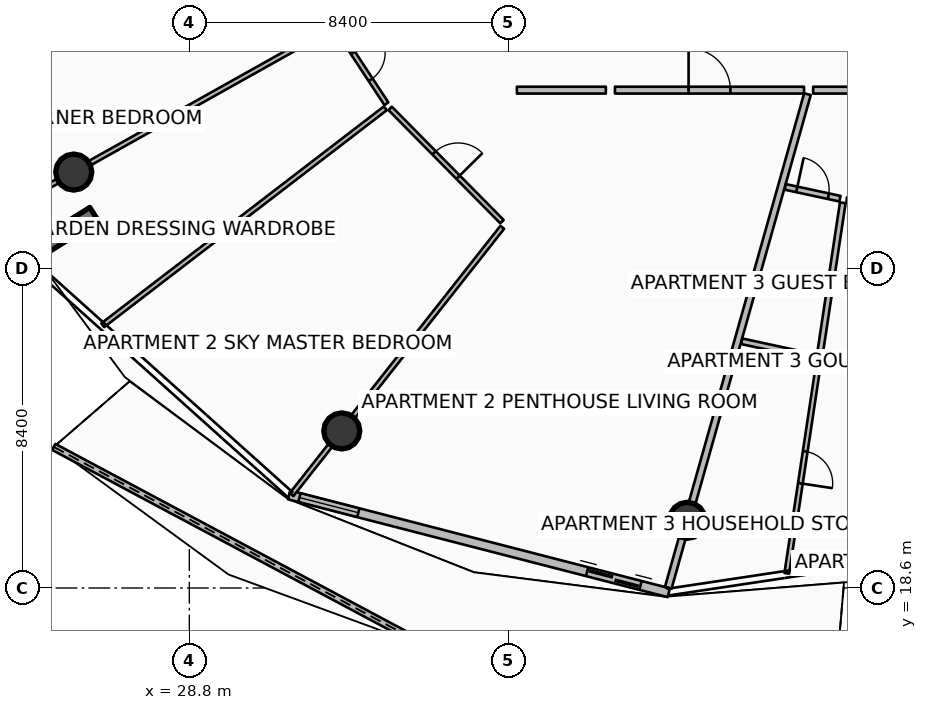
"""IFC4 building model, lengths in metres.
Left out: names, types, materials, properties, quantities, classifications, styles, units other than length and angle.
Written with IfcOpenShell. Run it as: python <this file> out.ifc"""

import sys

from ifc_helpers import new_model, si_unit, direction, frame, frame_2d, origin, origin_2d, place, context, subcontext, project, spatial, polyline, rectangle, circle, outline, extrude, element, fill, save


model = new_model("IFC4")
c1 = context("Model", 3, precision=1e-05, world=origin(), true_north=direction((0.0, 1.0)))
c2 = subcontext(c1, "Body", "Model", "MODEL_VIEW")
j1 = project(units=[si_unit("LENGTHUNIT", "METRE"), si_unit("PLANEANGLEUNIT", "RADIAN")], contexts=[c1])
p1 = place(None, origin())
s1 = spatial("IfcSite", under=j1, at=p1, CompositionType="ELEMENT")
p2 = place(p1, origin())
s2 = spatial("IfcBuilding", under=s1, at=p2, CompositionType="ELEMENT")
p3 = place(p2, frame((0.0, 0.0, 309.85)))
s3 = spatial("IfcBuildingStorey", under=s2, at=p3, CompositionType="ELEMENT", Elevation=309.85)
p4 = place(p3, frame((26.293, 28.436, 0.0), z_axis=(0.0, 0.0, 1.0), x_axis=(-0.848053161125, -0.529911158502, 0.0)))
e1 = element("IfcWall", 1, at=p4, inside=s3, PredefinedType="SOLIDWALL", context=c2, shape_type="SweptSolid", body=[
    extrude(rectangle(XDim=3.5, YDim=0.42, at=frame_2d((1.75, 0.0))), origin(), (0.0, 0.0, 1.0), 3.85),
])
p5 = place(p3, frame((25.758, 29.544, 0.0), z_axis=(0.31032645066, 0.173748419839, 0.934617023504), x_axis=(-0.488529751374, 0.872547237703, 0.0)))
e2 = element("IfcColumn", 2, at=p5, inside=s3, PredefinedType="COLUMN", context=c2, shape_type="SweptSolid", body=[
    extrude(circle(Radius=0.475, at=origin_2d()), origin(), (0.0, 0.0, 1.0), 3.691),
])
p6 = place(p3, frame((32.811, 22.733, 0.0), z_axis=(0.212907110385, 0.270054462111, 0.939010729354), x_axis=(-0.785298072574, 0.619117870208, 0.0)))
e3 = element("IfcColumn", 3, at=p6, inside=s3, PredefinedType="COLUMN", context=c2, shape_type="SweptSolid", body=[
    extrude(circle(Radius=0.475, at=origin_2d()), origin(), (0.0, 0.0, 1.0), 3.674),
])
p7 = place(p3, frame((41.903, 20.381, 0.0), z_axis=(0.086284912029, 0.305955831144, 0.948127598662), x_axis=(-0.962458159265, 0.271430086144, 0.0)))
e4 = element("IfcColumn", 4, at=p7, inside=s3, PredefinedType="COLUMN", context=c2, shape_type="SweptSolid", body=[
    extrude(circle(Radius=0.475, at=origin_2d()), origin(), (0.0, 0.0, 1.0), 3.639),
])
p8 = place(p3, frame((25.232, 22.312, 0.0), z_axis=(0.0, 0.0, 1.0), x_axis=(0.882187395897, -0.470898501294, 0.0)))
e5 = element("IfcWall", 5, at=p8, inside=s3, PredefinedType="PARAPET", context=c2, shape_type="SweptSolid", body=[
    extrude(outline(polyline([(0.0, 0.0), (11.23, 0.0), (11.23, 1.632), (5.615, 1.798), (0.0, 1.86), (0.0, 0.0)])), frame((0.0, 0.09, 0.0), z_axis=(0.0, -1.0, 0.0), x_axis=(1.0, 0.0, 0.0)), (0.0, 0.0, 1.0), 0.18),
])
p9 = place(p3, frame((31.426, 21.05, 0.0), z_axis=(0.0, 0.0, 1.0), x_axis=(0.968369046262, -0.249522324133, 0.0)))
e6 = element("IfcWall", 6, at=p9, inside=s3, PredefinedType="SOLIDWALL", context=c2, shape_type="SweptSolid", body=[
    extrude(rectangle(XDim=10.318, YDim=0.24, at=frame_2d((5.159, 0.0))), origin(), (0.0, 0.0, 1.0), 2.4),
])
p10 = place(p9, frame((8.097, 0.0, 0.0)))
e7 = element("IfcOpeningElement", 7, at=p10, cuts=e6, PredefinedType="OPENING", context=c2, shape_type="SweptSolid", body=[
    extrude(rectangle(XDim=1.45, YDim=2.15, at=frame_2d((0.725, 1.075))), frame((0.0, 0.13, 0.0), z_axis=(0.0, -1.0, 0.0), x_axis=(1.0, 0.0, 0.0)), (0.0, 0.0, 1.0), 0.26),
])
p11 = place(p9, frame((0.28, 0.0, 0.65)))
e8 = element("IfcOpeningElement", 8, at=p11, cuts=e6, PredefinedType="OPENING", context=c2, shape_type="SweptSolid", body=[
    extrude(rectangle(XDim=1.6, YDim=1.5, at=frame_2d((0.8, 0.75))), frame((0.0, 0.13, 0.0), z_axis=(0.0, -1.0, 0.0), x_axis=(1.0, 0.0, 0.0)), (0.0, 0.0, 1.0), 0.26),
])
p12 = place(p3, frame((45.065, 31.594, 0.0), z_axis=(0.0, 0.0, 1.0), x_axis=(-0.271447701057, -0.962453191376, 0.0)))
e9 = element("IfcWall", 9, at=p12, inside=s3, PredefinedType="PARTITIONING", context=c2, shape_type="SweptSolid", body=[
    extrude(rectangle(XDim=13.492, YDim=0.18, at=frame_2d((6.746, 0.0))), origin(), (0.0, 0.0, 1.0), 2.407),
])
p13 = place(p3, frame((40.0, 31.7, 0.0), z_axis=(0.0, 0.0, 1.0), x_axis=(1.0, 0.0, 0.0)))
e10 = element("IfcWall", 10, at=p13, inside=s3, PredefinedType="PARTITIONING", context=c2, shape_type="SweptSolid", body=[
    extrude(rectangle(XDim=4.975, YDim=0.18, at=frame_2d((2.488, 0.0))), origin(), (0.0, 0.0, 1.0), 2.407),
])
p14 = place(p13, frame((1.938, 0.0, 0.0)))
e11 = element("IfcOpeningElement", 11, at=p14, cuts=e10, PredefinedType="OPENING", context=c2, shape_type="SweptSolid", body=[
    extrude(rectangle(XDim=1.1, YDim=2.1, at=frame_2d((0.55, 1.05))), frame((0.0, 0.1, 0.0), z_axis=(0.0, -1.0, 0.0), x_axis=(1.0, 0.0, 0.0)), (0.0, 0.0, 1.0), 0.2),
])
p15 = place(p3, frame((31.541, 35.483, 0.0), z_axis=(0.0, 0.0, 1.0), x_axis=(-0.929778742412, -0.368118853305, 0.0)))
e12 = element("IfcWall", 12, at=p15, inside=s3, PredefinedType="PARTITIONING", context=c2, shape_type="SweptSolid", body=[
    extrude(rectangle(XDim=9.244, YDim=0.125, at=frame_2d((4.622, 0.0))), origin(), (0.0, 0.0, 1.0), 2.425),
])
p16 = place(p3, frame((37.42, 31.7, 0.0), z_axis=(0.0, 0.0, 1.0), x_axis=(1.0, 0.0, 0.0)))
e13 = element("IfcWall", 13, at=p16, inside=s3, PredefinedType="PARTITIONING", context=c2, shape_type="SweptSolid", body=[
    extrude(rectangle(XDim=2.34, YDim=0.18, at=frame_2d((1.17, 0.0))), origin(), (0.0, 0.0, 1.0), 2.407),
])
p17 = place(p3, frame((32.546, 33.345, 0.0), z_axis=(0.0, 0.0, 1.0), x_axis=(-0.872502156347, -0.488610261015, 0.0)))
e14 = element("IfcWall", 14, at=p17, inside=s3, PredefinedType="PARTITIONING", context=c2, shape_type="SweptSolid", body=[
    extrude(rectangle(XDim=9.708, YDim=0.125, at=frame_2d((4.854, 0.0))), origin(), (0.0, 0.0, 1.0), 2.407),
])
p18 = place(p3, frame((37.035, 28.091, 0.0), z_axis=(0.0, 0.0, 1.0), x_axis=(-0.619104103532, -0.785308925831, 0.0)))
e15 = element("IfcWall", 15, at=p18, inside=s3, PredefinedType="PARTITIONING", context=c2, shape_type="SweptSolid", body=[
    extrude(rectangle(XDim=8.956, YDim=0.125, at=frame_2d((4.478, 0.0))), origin(), (0.0, 0.0, 1.0), 2.407),
])
p19 = place(p3, frame((33.958, 31.222, 0.0), z_axis=(0.0, 0.0, 1.0), x_axis=(-0.793278024222, -0.608859570251, 0.0)))
e16 = element("IfcWall", 16, at=p19, inside=s3, PredefinedType="PARTITIONING", context=c2, shape_type="SweptSolid", body=[
    extrude(rectangle(XDim=9.374, YDim=0.125, at=frame_2d((4.687, 0.0))), origin(), (0.0, 0.0, 1.0), 2.425),
])
p20 = place(p3, frame((32.689, 33.311, 0.0), z_axis=(0.0, 0.0, 1.0), x_axis=(0.550172145672, -0.835051261975, 0.0)))
e17 = element("IfcWall", 17, at=p20, inside=s3, PredefinedType="PARTITIONING", context=c2, shape_type="SweptSolid", body=[
    extrude(rectangle(XDim=2.356, YDim=0.125, at=frame_2d((1.178, 0.0))), origin(), (0.0, 0.0, 1.0), 2.407),
])
p21 = place(p20, frame((0.753, 0.0, 0.0)))
e18 = element("IfcOpeningElement", 18, at=p21, cuts=e17, PredefinedType="OPENING", context=c2, shape_type="SweptSolid", body=[
    extrude(rectangle(XDim=0.85, YDim=2.06, at=frame_2d((0.425, 1.03))), frame((0.0, 0.073, 0.0), z_axis=(0.0, -1.0, 0.0), x_axis=(1.0, 0.0, 0.0)), (0.0, 0.0, 1.0), 0.145),
])
p22 = place(p3, frame((34.085, 31.22, 0.0), z_axis=(0.0, 0.0, 1.0), x_axis=(0.702484741941, -0.711698803806, 0.0)))
e19 = element("IfcWall", 19, at=p22, inside=s3, PredefinedType="PARTITIONING", context=c2, shape_type="SweptSolid", body=[
    extrude(rectangle(XDim=4.187, YDim=0.125, at=frame_2d((2.093, 0.0))), origin(), (0.0, 0.0, 1.0), 2.407),
])
p23 = place(p22, frame((1.643, 0.0, 0.0)))
e20 = element("IfcOpeningElement", 20, at=p23, cuts=e19, PredefinedType="OPENING", context=c2, shape_type="SweptSolid", body=[
    extrude(rectangle(XDim=0.9, YDim=2.08, at=frame_2d((0.45, 1.04))), frame((0.0, 0.073, 0.0), z_axis=(0.0, -1.0, 0.0), x_axis=(1.0, 0.0, 0.0)), (0.0, 0.0, 1.0), 0.145),
])
p24 = place(p3, frame((45.215, 31.7, 0.0), z_axis=(0.0, 0.0, 1.0), x_axis=(1.0, 0.0, 0.0)))
e21 = element("IfcWall", 21, at=p24, inside=s3, PredefinedType="PARTITIONING", context=c2, shape_type="SweptSolid", body=[
    extrude(rectangle(XDim=3.884, YDim=0.18, at=frame_2d((1.942, 0.0))), origin(), (0.0, 0.0, 1.0), 2.407),
])
p25 = place(p3, frame((44.481, 29.154, 0.0), z_axis=(0.0, 0.0, 1.0), x_axis=(0.977483516551, -0.211011788464, 0.0)))
e22 = element("IfcWall", 22, at=p25, inside=s3, PredefinedType="PARTITIONING", context=c2, shape_type="SweptSolid", body=[
    extrude(rectangle(XDim=1.473, YDim=0.15, at=frame_2d((0.736, 0.0))), origin(), (0.0, 0.0, 1.0), 2.407),
])
p26 = place(p25, frame((0.311, 0.0, 0.0)))
e23 = element("IfcOpeningElement", 23, at=p26, cuts=e22, PredefinedType="OPENING", context=c2, shape_type="SweptSolid", body=[
    extrude(rectangle(XDim=0.85, YDim=2.06, at=frame_2d((0.425, 1.03))), frame((0.0, 0.085, 0.0), z_axis=(0.0, -1.0, 0.0), x_axis=(1.0, 0.0, 0.0)), (0.0, 0.0, 1.0), 0.17),
])
p27 = place(p3, frame((43.335, 25.093, 0.0), z_axis=(0.0, 0.0, 1.0), x_axis=(0.977510186352, -0.21088820635, 0.0)))
e24 = element("IfcWall", 24, at=p27, inside=s3, PredefinedType="PARTITIONING", context=c2, shape_type="SweptSolid", body=[
    extrude(rectangle(XDim=1.999, YDim=0.15, at=frame_2d((1.0, 0.0))), origin(), (0.0, 0.0, 1.0), 2.407),
])
p28 = place(p3, frame((45.995, 28.736, 0.0), z_axis=(0.0, 0.0, 1.0), x_axis=(-0.149472929776, -0.988765818212, 0.0)))
e25 = element("IfcWall", 25, at=p28, inside=s3, PredefinedType="PARTITIONING", context=c2, shape_type="SweptSolid", body=[
    extrude(rectangle(XDim=4.09, YDim=0.15, at=frame_2d((2.045, 0.0))), origin(), (0.0, 0.0, 1.0), 2.89),
])
p29 = place(p3, frame((45.365, 24.563, 0.0), z_axis=(0.0, 0.0, 1.0), x_axis=(-0.149483487693, -0.988764222101, 0.0)))
e26 = element("IfcWall", 26, at=p29, inside=s3, PredefinedType="PARTITIONING", context=c2, shape_type="SweptSolid", body=[
    extrude(rectangle(XDim=5.64, YDim=0.125, at=frame_2d((2.82, 0.0))), origin(), (0.0, 0.0, 1.0), 2.425),
])
p30 = place(p29, frame((2.395, 0.0, 0.0)))
e27 = element("IfcOpeningElement", 27, at=p30, cuts=e26, PredefinedType="OPENING", context=c2, shape_type="SweptSolid", body=[
    extrude(rectangle(XDim=0.85, YDim=2.06, at=frame_2d((0.425, 1.03))), frame((0.0, 0.073, 0.0), z_axis=(0.0, -1.0, 0.0), x_axis=(1.0, 0.0, 0.0)), (0.0, 0.0, 1.0), 0.145),
])
p31 = place(p3, frame((46.098, 28.818, 0.0), z_axis=(0.0, 0.0, 1.0), x_axis=(0.996932576334, -0.078265179002, 0.0)))
e28 = element("IfcWall", 28, at=p31, inside=s3, PredefinedType="PARTITIONING", context=c2, shape_type="SweptSolid", body=[
    extrude(rectangle(XDim=1.738, YDim=0.125, at=frame_2d((0.869, 0.0))), origin(), (0.0, 0.0, 1.0), 2.89),
])
p32 = place(p31, frame((0.444, 0.0, 0.0)))
e29 = element("IfcOpeningElement", 29, at=p32, cuts=e28, PredefinedType="OPENING", context=c2, shape_type="SweptSolid", body=[
    extrude(rectangle(XDim=0.85, YDim=2.06, at=frame_2d((0.425, 1.03))), frame((0.0, 0.073, 0.0), z_axis=(0.0, -1.0, 0.0), x_axis=(1.0, 0.0, 0.0)), (0.0, 0.0, 1.0), 0.145),
])
p33 = place(p10, origin())
e30 = element("IfcDoor", 30, at=p33, inside=s3, OperationType="DOUBLE_DOOR_SLIDING", PredefinedType="DOOR", context=c2, shape_type="SweptSolid", body=[
    extrude(rectangle(XDim=1.45, YDim=2.15, at=frame_2d((0.725, 1.075))), frame((0.0, 0.025, 0.0), z_axis=(0.0, -1.0, 0.0), x_axis=(1.0, 0.0, 0.0)), (0.0, 0.0, 1.0), 0.05),
])
fill(e7, e30)
p34 = place(p11, origin())
e31 = element("IfcWindow", 31, at=p34, inside=s3, PartitioningType="SINGLE_PANEL", PredefinedType="WINDOW", context=c2, shape_type="SweptSolid", body=[
    extrude(rectangle(XDim=1.6, YDim=1.5, at=frame_2d((0.8, 0.75))), frame((0.0, 0.03, 0.0), z_axis=(0.0, -1.0, 0.0), x_axis=(1.0, 0.0, 0.0)), (0.0, 0.0, 1.0), 0.06),
])
fill(e8, e31)
p35 = place(p14, origin())
e32 = element("IfcDoor", 32, at=p35, inside=s3, OperationType="SINGLE_SWING_LEFT", PredefinedType="DOOR", context=c2, shape_type="SweptSolid", body=[
    extrude(rectangle(XDim=1.1, YDim=2.1, at=frame_2d((0.55, 1.05))), frame((0.0, 0.025, 0.0), z_axis=(0.0, -1.0, 0.0), x_axis=(1.0, 0.0, 0.0)), (0.0, 0.0, 1.0), 0.05),
])
fill(e11, e32)
p36 = place(p21, origin())
e33 = element("IfcDoor", 33, at=p36, inside=s3, OperationType="SINGLE_SWING_LEFT", PredefinedType="DOOR", context=c2, shape_type="SweptSolid", body=[
    extrude(rectangle(XDim=0.85, YDim=2.06, at=frame_2d((0.425, 1.03))), frame((0.0, 0.025, 0.0), z_axis=(0.0, -1.0, 0.0), x_axis=(1.0, 0.0, 0.0)), (0.0, 0.0, 1.0), 0.05),
])
fill(e18, e33)
p37 = place(p23, origin())
e34 = element("IfcDoor", 34, at=p37, inside=s3, OperationType="SINGLE_SWING_RIGHT", PredefinedType="DOOR", context=c2, shape_type="SweptSolid", body=[
    extrude(rectangle(XDim=0.9, YDim=2.08, at=frame_2d((0.45, 1.04))), frame((0.0, 0.025, 0.0), z_axis=(0.0, -1.0, 0.0), x_axis=(1.0, 0.0, 0.0)), (0.0, 0.0, 1.0), 0.05),
])
fill(e20, e34)
p38 = place(p26, origin())
e35 = element("IfcDoor", 35, at=p38, inside=s3, OperationType="SINGLE_SWING_LEFT", PredefinedType="DOOR", context=c2, shape_type="SweptSolid", body=[
    extrude(rectangle(XDim=0.85, YDim=2.06, at=frame_2d((0.425, 1.03))), frame((0.0, 0.025, 0.0), z_axis=(0.0, -1.0, 0.0), x_axis=(1.0, 0.0, 0.0)), (0.0, 0.0, 1.0), 0.05),
])
fill(e23, e35)
p39 = place(p30, origin())
e36 = element("IfcDoor", 36, at=p39, inside=s3, OperationType="SINGLE_SWING_RIGHT", PredefinedType="DOOR", context=c2, shape_type="SweptSolid", body=[
    extrude(rectangle(XDim=0.85, YDim=2.06, at=frame_2d((0.425, 1.03))), frame((0.0, 0.025, 0.0), z_axis=(0.0, -1.0, 0.0), x_axis=(1.0, 0.0, 0.0)), (0.0, 0.0, 1.0), 0.05),
])
fill(e27, e36)
save(model, sys.argv[1])
